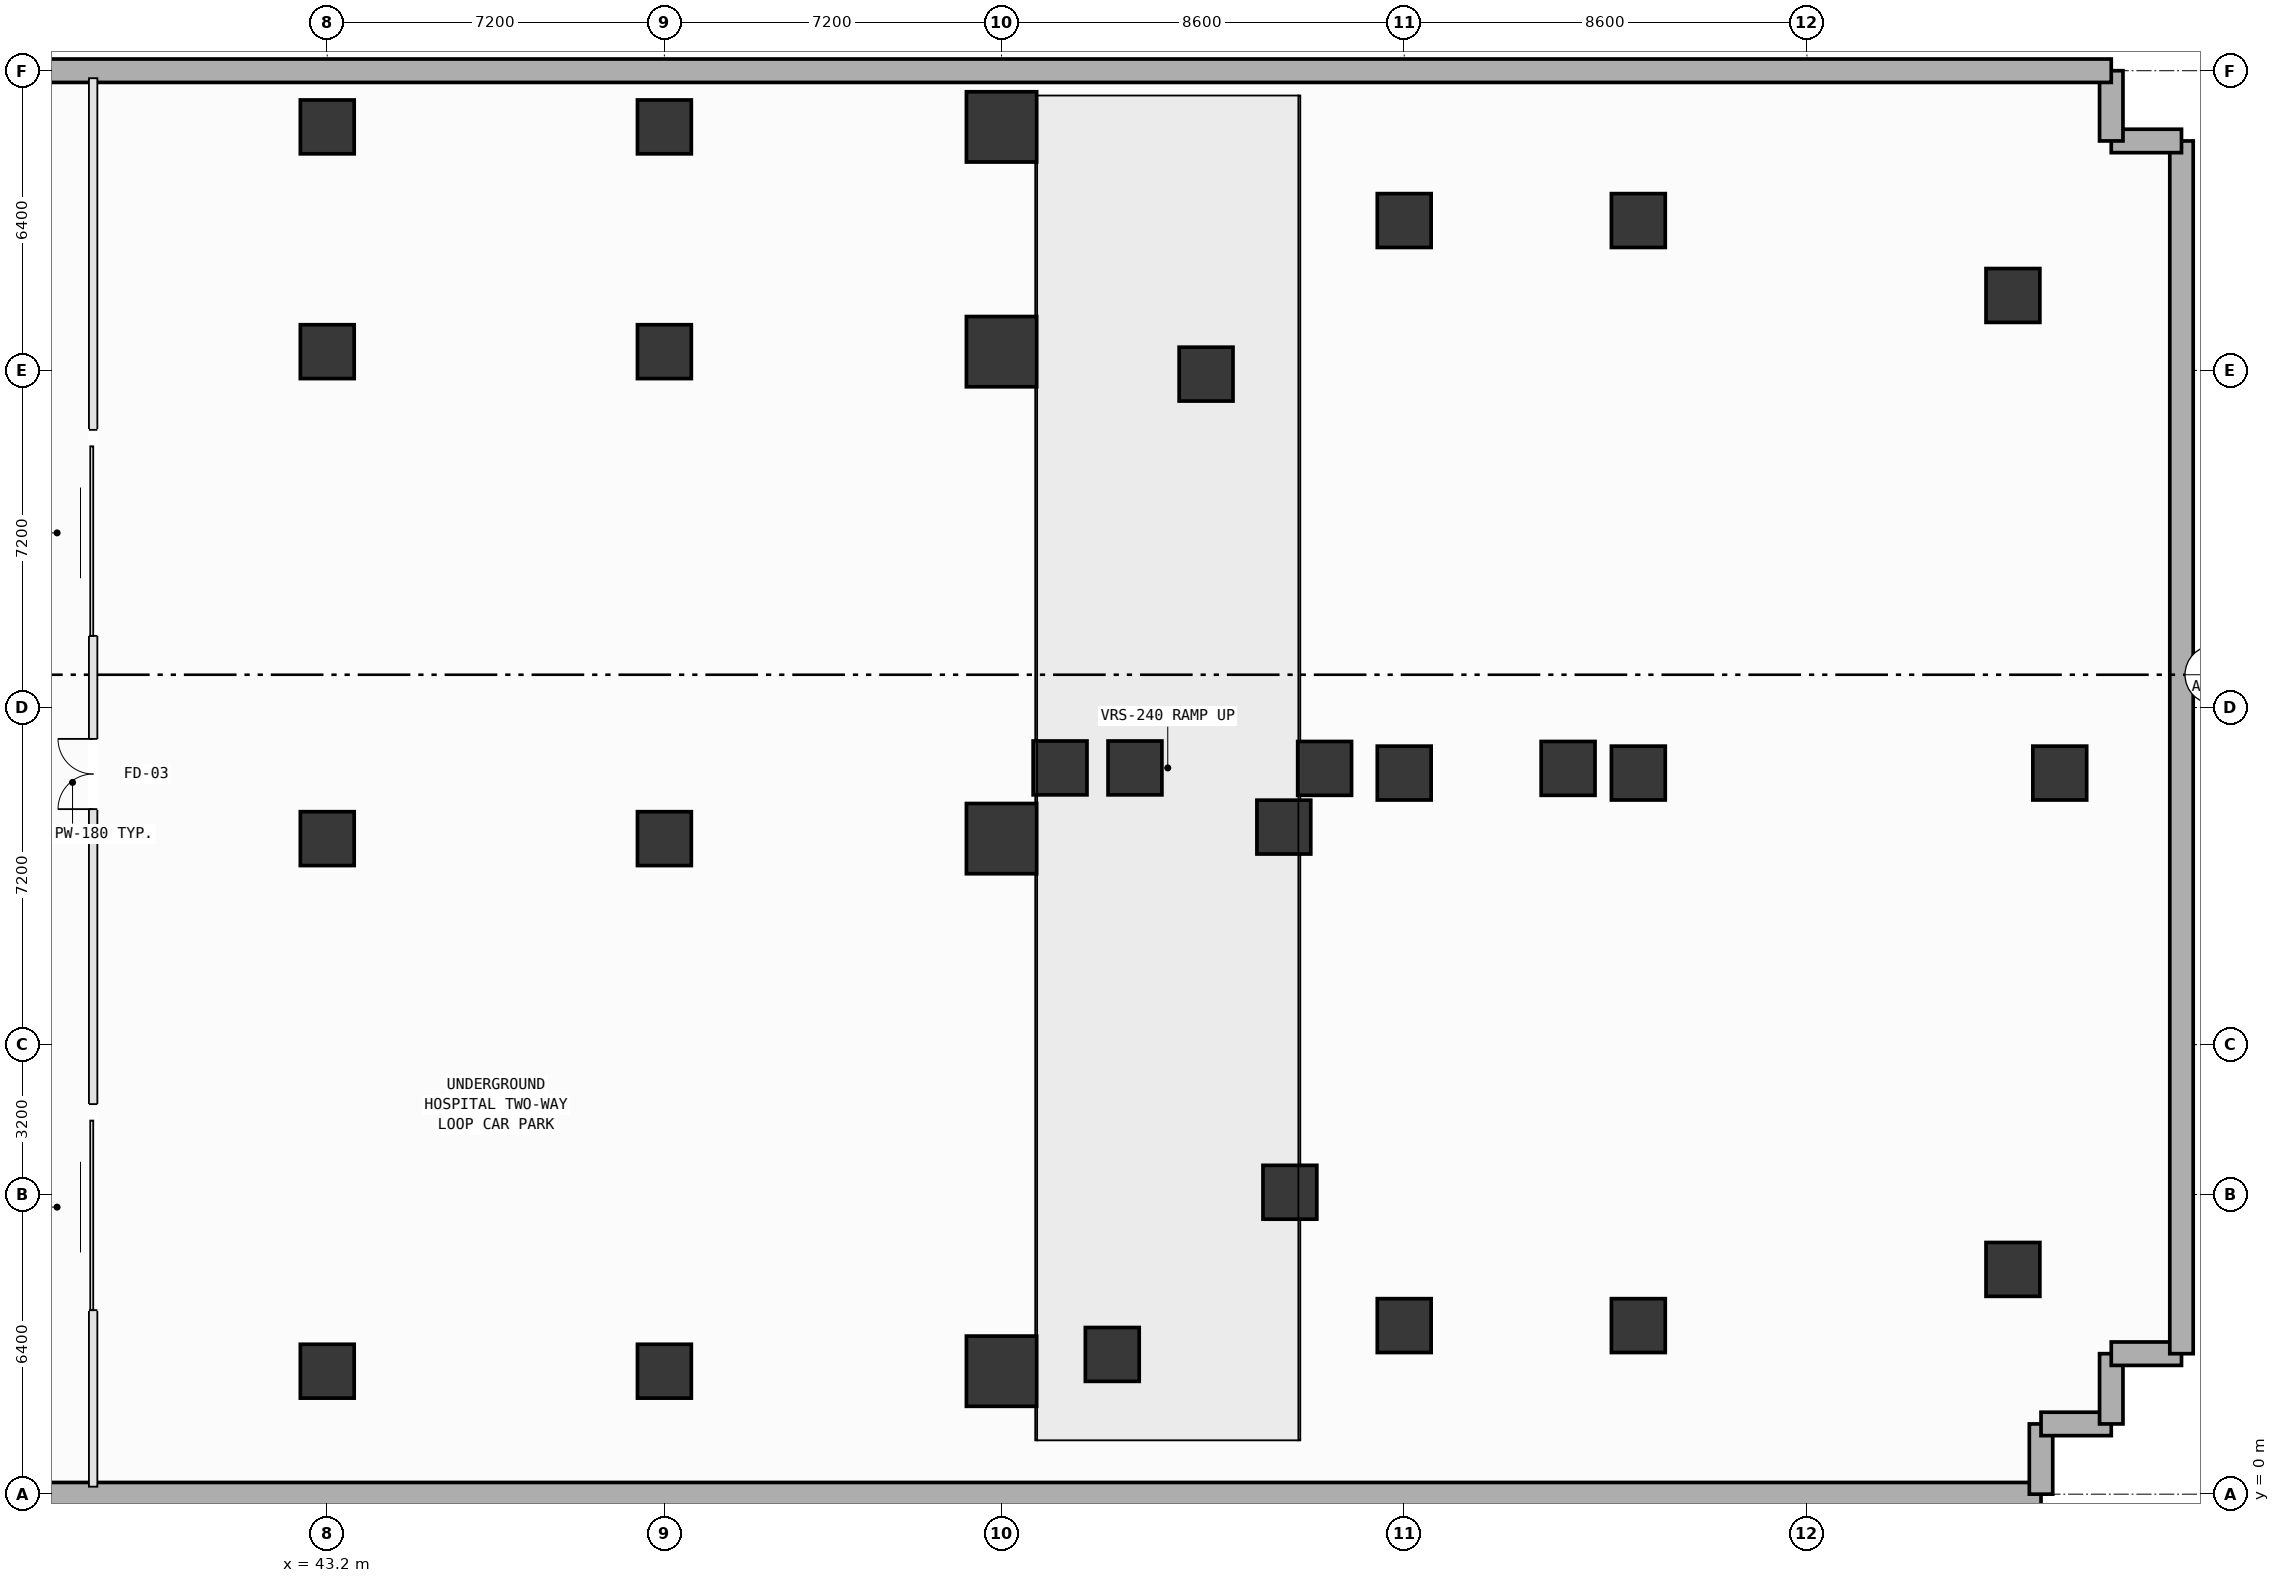
"""IFC4 building model, lengths in metres.
Left out: names, types, materials, properties, quantities, classifications, styles, units other than length and angle.
Written with IfcOpenShell. Run it as: python <this file> out.ifc"""

import sys

from ifc_helpers import new_model, si_unit, direction, frame, frame_2d, origin, origin_2d, place, context, subcontext, project, spatial, rectangle, extrude, element, fill, save


model = new_model("IFC4")
c1 = context("Model", 3, precision=1e-05, world=origin(), true_north=direction((0.0, 1.0)))
c2 = subcontext(c1, "Body", "Model", "MODEL_VIEW")
j1 = project(units=[si_unit("LENGTHUNIT", "METRE"), si_unit("PLANEANGLEUNIT", "RADIAN")], contexts=[c1])
p1 = place(None, origin())
s1 = spatial("IfcSite", under=j1, at=p1, CompositionType="ELEMENT")
p2 = place(p1, origin())
s2 = spatial("IfcBuilding", under=s1, at=p2, CompositionType="ELEMENT")
p3 = place(p2, frame((0.0, 0.0, -9.6)))
s3 = spatial("IfcBuildingStorey", under=s2, at=p3, CompositionType="ELEMENT", Elevation=-9.6)
for number, where, z_axis, x_axis in (
    (1, (64.5, 15.5, 0.0), (0.0, 0.0, 1.0), (1.0, 0.0, 0.0)),
    (2, (69.7, 15.5, 0.0), (0.0, 0.0, 1.0), (1.0, 0.0, 0.0)),
):
    element("IfcColumn", number, at=place(p3, frame(where, z_axis=z_axis, x_axis=x_axis)), inside=s3, PredefinedType="COLUMN", context=c2, shape_type="SweptSolid", body=[
        extrude(rectangle(XDim=1.15, YDim=1.15, at=origin_2d()), origin(), (0.0, 0.0, 1.0), 4.8),
    ])
for number, where, z_axis, x_axis in (
    (3, (58.85, 15.51, 0.003), (0.0, 0.0, 1.0), (1.0, 0.0, 0.0)),
    (4, (60.45, 15.51, 0.003), (0.0, 0.0, 1.0), (1.0, 0.0, 0.0)),
):
    element("IfcColumn", number, at=place(p3, frame(where, z_axis=z_axis, x_axis=x_axis)), inside=s3, PredefinedType="COLUMN", context=c2, shape_type="SweptSolid", body=[
        extrude(rectangle(XDim=1.15, YDim=1.15, at=origin_2d()), origin(), (0.0, 0.0, 1.0), 2.27),
    ])
p4 = place(p3, frame((57.6, 2.626, 0.0), z_axis=(0.0, 0.0, 1.0), x_axis=(1.0, 0.0, 0.0)))
e5 = element("IfcColumn", 5, at=p4, inside=s3, PredefinedType="PILASTER", context=c2, shape_type="SweptSolid", body=[
    extrude(rectangle(XDim=1.5, YDim=1.5, at=origin_2d()), origin(), (0.0, 0.0, 1.0), 4.8),
])
for number, where, z_axis, x_axis in (
    (6, (43.2, 2.626, 0.0), (0.0, 0.0, 1.0), (1.0, 0.0, 0.0)),
    (7, (50.4, 2.626, 0.0), (0.0, 0.0, 1.0), (1.0, 0.0, 0.0)),
):
    element("IfcColumn", number, at=place(p3, frame(where, z_axis=z_axis, x_axis=x_axis)), inside=s3, PredefinedType="COLUMN", context=c2, shape_type="SweptSolid", body=[
        extrude(rectangle(XDim=1.15, YDim=1.15, at=origin_2d()), origin(), (0.0, 0.0, 1.0), 4.8),
    ])
p5 = place(p3, frame((57.6, 14.0, 0.0), z_axis=(0.0, 0.0, 1.0), x_axis=(1.0, 0.0, 0.0)))
e8 = element("IfcColumn", 8, at=p5, inside=s3, PredefinedType="PILASTER", context=c2, shape_type="SweptSolid", body=[
    extrude(rectangle(XDim=1.5, YDim=1.5, at=origin_2d()), origin(), (0.0, 0.0, 1.0), 4.8),
])
for number, where, z_axis, x_axis in (
    (9, (43.2, 14.0, 0.0), (0.0, 0.0, 1.0), (1.0, 0.0, 0.0)),
    (10, (50.4, 14.0, 0.0), (0.0, 0.0, 1.0), (1.0, 0.0, 0.0)),
):
    element("IfcColumn", number, at=place(p3, frame(where, z_axis=z_axis, x_axis=x_axis)), inside=s3, PredefinedType="COLUMN", context=c2, shape_type="SweptSolid", body=[
        extrude(rectangle(XDim=1.15, YDim=1.15, at=origin_2d()), origin(), (0.0, 0.0, 1.0), 4.8),
    ])
p6 = place(p3, frame((57.6, 24.4, 0.0), z_axis=(0.0, 0.0, 1.0), x_axis=(1.0, 0.0, 0.0)))
e11 = element("IfcColumn", 11, at=p6, inside=s3, PredefinedType="PILASTER", context=c2, shape_type="SweptSolid", body=[
    extrude(rectangle(XDim=1.5, YDim=1.5, at=origin_2d()), origin(), (0.0, 0.0, 1.0), 4.8),
])
for number, where, z_axis, x_axis in (
    (12, (43.2, 24.4, 0.0), (0.0, 0.0, 1.0), (1.0, 0.0, 0.0)),
    (13, (50.4, 24.4, 0.0), (0.0, 0.0, 1.0), (1.0, 0.0, 0.0)),
):
    element("IfcColumn", number, at=place(p3, frame(where, z_axis=z_axis, x_axis=x_axis)), inside=s3, PredefinedType="COLUMN", context=c2, shape_type="SweptSolid", body=[
        extrude(rectangle(XDim=1.15, YDim=1.15, at=origin_2d()), origin(), (0.0, 0.0, 1.0), 4.8),
    ])
p7 = place(p3, frame((57.6, 29.2, 0.0), z_axis=(0.0, 0.0, 1.0), x_axis=(1.0, 0.0, 0.0)))
e14 = element("IfcColumn", 14, at=p7, inside=s3, PredefinedType="PILASTER", context=c2, shape_type="SweptSolid", body=[
    extrude(rectangle(XDim=1.5, YDim=1.5, at=origin_2d()), origin(), (0.0, 0.0, 1.0), 4.8),
])
for number, where, z_axis, x_axis in (
    (15, (43.2, 29.2, 0.0), (0.0, 0.0, 1.0), (1.0, 0.0, 0.0)),
    (16, (50.4, 29.2, 0.0), (0.0, 0.0, 1.0), (1.0, 0.0, 0.0)),
    (17, (59.965, 2.984, 0.0), (0.0, 0.0, 1.0), (1.0, 0.0, 0.0)),
    (18, (63.758, 6.448, 0.0), (0.0, 0.0, 1.0), (1.0, 0.0, 0.0)),
    (19, (63.629, 14.246, 0.0), (0.0, 0.0, 1.0), (1.0, 0.0, 0.0)),
    (20, (61.969, 23.92, 0.0), (0.0, 0.0, 1.0), (1.0, 0.0, 0.0)),
    (21, (66.2, 3.6, 0.0), (0.0, 0.0, 1.0), (1.0, 0.0, 0.0)),
    (22, (71.2, 3.6, 0.0), (0.0, 0.0, 1.0), (1.0, 0.0, 0.0)),
    (23, (66.2, 15.4, 0.0), (0.0, 0.0, 1.0), (1.0, 0.0, 0.0)),
    (24, (71.2, 15.4, 0.0), (0.0, 0.0, 1.0), (1.0, 0.0, 0.0)),
    (25, (66.2, 27.2, 0.0), (0.0, 0.0, 1.0), (1.0, 0.0, 0.0)),
    (26, (71.2, 27.2, 0.0), (0.0, 0.0, 1.0), (1.0, 0.0, 0.0)),
    (27, (79.2, 4.8, 0.0), (0.0, 0.0, 1.0), (1.0, 0.0, 0.0)),
    (28, (80.2, 15.4, 0.0), (0.0, 0.0, 1.0), (1.0, 0.0, 0.0)),
    (29, (79.2, 25.6, 0.0), (0.0, 0.0, 1.0), (1.0, 0.0, 0.0)),
):
    element("IfcColumn", number, at=place(p3, frame(where, z_axis=z_axis, x_axis=x_axis)), inside=s3, PredefinedType="COLUMN", context=c2, shape_type="SweptSolid", body=[
        extrude(rectangle(XDim=1.15, YDim=1.15, at=origin_2d()), origin(), (0.0, 0.0, 1.0), 4.8),
    ])
p8 = place(p3, frame((79.8, 0.0, 0.0), z_axis=(0.0, 0.0, 1.0), x_axis=(-1.0, 0.0, 0.0)))
e30 = element("IfcWall", 30, at=p8, inside=s3, PredefinedType="USERDEFINED", context=c2, shape_type="SweptSolid", body=[
    extrude(rectangle(XDim=76.8, YDim=0.5, at=frame_2d((38.4, 0.0))), origin(), (0.0, 0.0, 1.0), 4.55),
])
for number, where, z_axis, x_axis in (
    (31, (79.8, 1.5, 0.0), (0.0, 0.0, 1.0), (0.0, -1.0, 0.0)),
    (32, (81.3, 1.5, 0.0), (0.0, 0.0, 1.0), (-1.0, 0.0, 0.0)),
    (33, (81.3, 3.0, 0.0), (0.0, 0.0, 1.0), (0.0, -1.0, 0.0)),
    (34, (82.8, 3.0, 0.0), (0.0, 0.0, 1.0), (-1.0, 0.0, 0.0)),
):
    element("IfcWall", number, at=place(p3, frame(where, z_axis=z_axis, x_axis=x_axis)), inside=s3, PredefinedType="USERDEFINED", context=c2, shape_type="SweptSolid", body=[
        extrude(rectangle(XDim=1.5, YDim=0.5, at=frame_2d((0.75, 0.0))), origin(), (0.0, 0.0, 1.0), 4.55),
    ])
p9 = place(p3, frame((82.8, 28.9, 0.0), z_axis=(0.0, 0.0, 1.0), x_axis=(0.0, -1.0, 0.0)))
e35 = element("IfcWall", 35, at=p9, inside=s3, PredefinedType="USERDEFINED", context=c2, shape_type="SweptSolid", body=[
    extrude(rectangle(XDim=25.9, YDim=0.5, at=frame_2d((12.95, 0.0))), origin(), (0.0, 0.0, 1.0), 4.55),
])
for number, where, z_axis, x_axis in (
    (36, (81.3, 28.9, 0.0), (0.0, 0.0, 1.0), (1.0, 0.0, 0.0)),
    (37, (81.3, 30.4, 0.0), (0.0, 0.0, 1.0), (0.0, -1.0, 0.0)),
):
    element("IfcWall", number, at=place(p3, frame(where, z_axis=z_axis, x_axis=x_axis)), inside=s3, PredefinedType="USERDEFINED", context=c2, shape_type="SweptSolid", body=[
        extrude(rectangle(XDim=1.5, YDim=0.5, at=frame_2d((0.75, 0.0))), origin(), (0.0, 0.0, 1.0), 4.55),
    ])
p10 = place(p3, frame((32.0, 30.4, 0.0), z_axis=(0.0, 0.0, 1.0), x_axis=(1.0, 0.0, 0.0)))
e38 = element("IfcWall", 38, at=p10, inside=s3, PredefinedType="USERDEFINED", context=c2, shape_type="SweptSolid", body=[
    extrude(rectangle(XDim=49.3, YDim=0.5, at=frame_2d((24.65, 0.0))), origin(), (0.0, 0.0, 1.0), 4.55),
])
p11 = place(p3, frame((38.2, 0.16, 0.0), z_axis=(0.0, 0.0, 1.0), x_axis=(0.0, 1.0, 0.0)))
e39 = element("IfcWall", 39, at=p11, inside=s3, PredefinedType="PARTITIONING", context=c2, shape_type="SweptSolid", body=[
    extrude(rectangle(XDim=30.08, YDim=0.18, at=frame_2d((15.04, 0.0))), origin(), (0.0, 0.0, 1.0), 4.55),
])
p12 = place(p11, frame((18.17, 0.0, 0.0)))
e40 = element("IfcOpeningElement", 40, at=p12, cuts=e39, PredefinedType="OPENING", context=c2, shape_type="SweptSolid", body=[
    extrude(rectangle(XDim=4.4, YDim=3.3, at=frame_2d((2.2, 1.65))), frame((0.0, 0.1, 0.0), z_axis=(0.0, -1.0, 0.0), x_axis=(1.0, 0.0, 0.0)), (0.0, 0.0, 1.0), 0.2),
])
p13 = place(p11, frame((14.47, 0.0, 0.0)))
e41 = element("IfcOpeningElement", 41, at=p13, cuts=e39, PredefinedType="OPENING", context=c2, shape_type="SweptSolid", body=[
    extrude(rectangle(XDim=1.5, YDim=2.2, at=frame_2d((0.75, 1.1))), frame((0.0, 0.1, 0.0), z_axis=(0.0, -1.0, 0.0), x_axis=(1.0, 0.0, 0.0)), (0.0, 0.0, 1.0), 0.2),
])
p14 = place(p11, frame((3.77, 0.0, 0.0)))
e42 = element("IfcOpeningElement", 42, at=p14, cuts=e39, PredefinedType="OPENING", context=c2, shape_type="SweptSolid", body=[
    extrude(rectangle(XDim=4.4, YDim=3.3, at=frame_2d((2.2, 1.65))), frame((0.0, 0.1, 0.0), z_axis=(0.0, -1.0, 0.0), x_axis=(1.0, 0.0, 0.0)), (0.0, 0.0, 1.0), 0.2),
])
p15 = place(p12, origin())
e43 = element("IfcDoor", 43, at=p15, inside=s3, OperationType="ROLLINGUP", PredefinedType="GATE", context=c2, shape_type="SweptSolid", body=[
    extrude(rectangle(XDim=4.4, YDim=3.3, at=frame_2d((2.2, 1.65))), frame((0.0, 0.025, 0.0), z_axis=(0.0, -1.0, 0.0), x_axis=(1.0, 0.0, 0.0)), (0.0, 0.0, 1.0), 0.05),
])
fill(e40, e43)
p16 = place(p13, origin())
e44 = element("IfcDoor", 44, at=p16, inside=s3, OperationType="DOUBLE_DOOR_SINGLE_SWING", PredefinedType="DOOR", context=c2, shape_type="SweptSolid", body=[
    extrude(rectangle(XDim=1.5, YDim=2.2, at=frame_2d((0.75, 1.1))), frame((0.0, 0.025, 0.0), z_axis=(0.0, -1.0, 0.0), x_axis=(1.0, 0.0, 0.0)), (0.0, 0.0, 1.0), 0.05),
])
fill(e41, e44)
p17 = place(p14, origin())
e45 = element("IfcDoor", 45, at=p17, inside=s3, OperationType="ROLLINGUP", PredefinedType="GATE", context=c2, shape_type="SweptSolid", body=[
    extrude(rectangle(XDim=4.4, YDim=3.3, at=frame_2d((2.2, 1.65))), frame((0.0, 0.025, 0.0), z_axis=(0.0, -1.0, 0.0), x_axis=(1.0, 0.0, 0.0)), (0.0, 0.0, 1.0), 0.05),
])
fill(e42, e45)
save(model, sys.argv[1])
